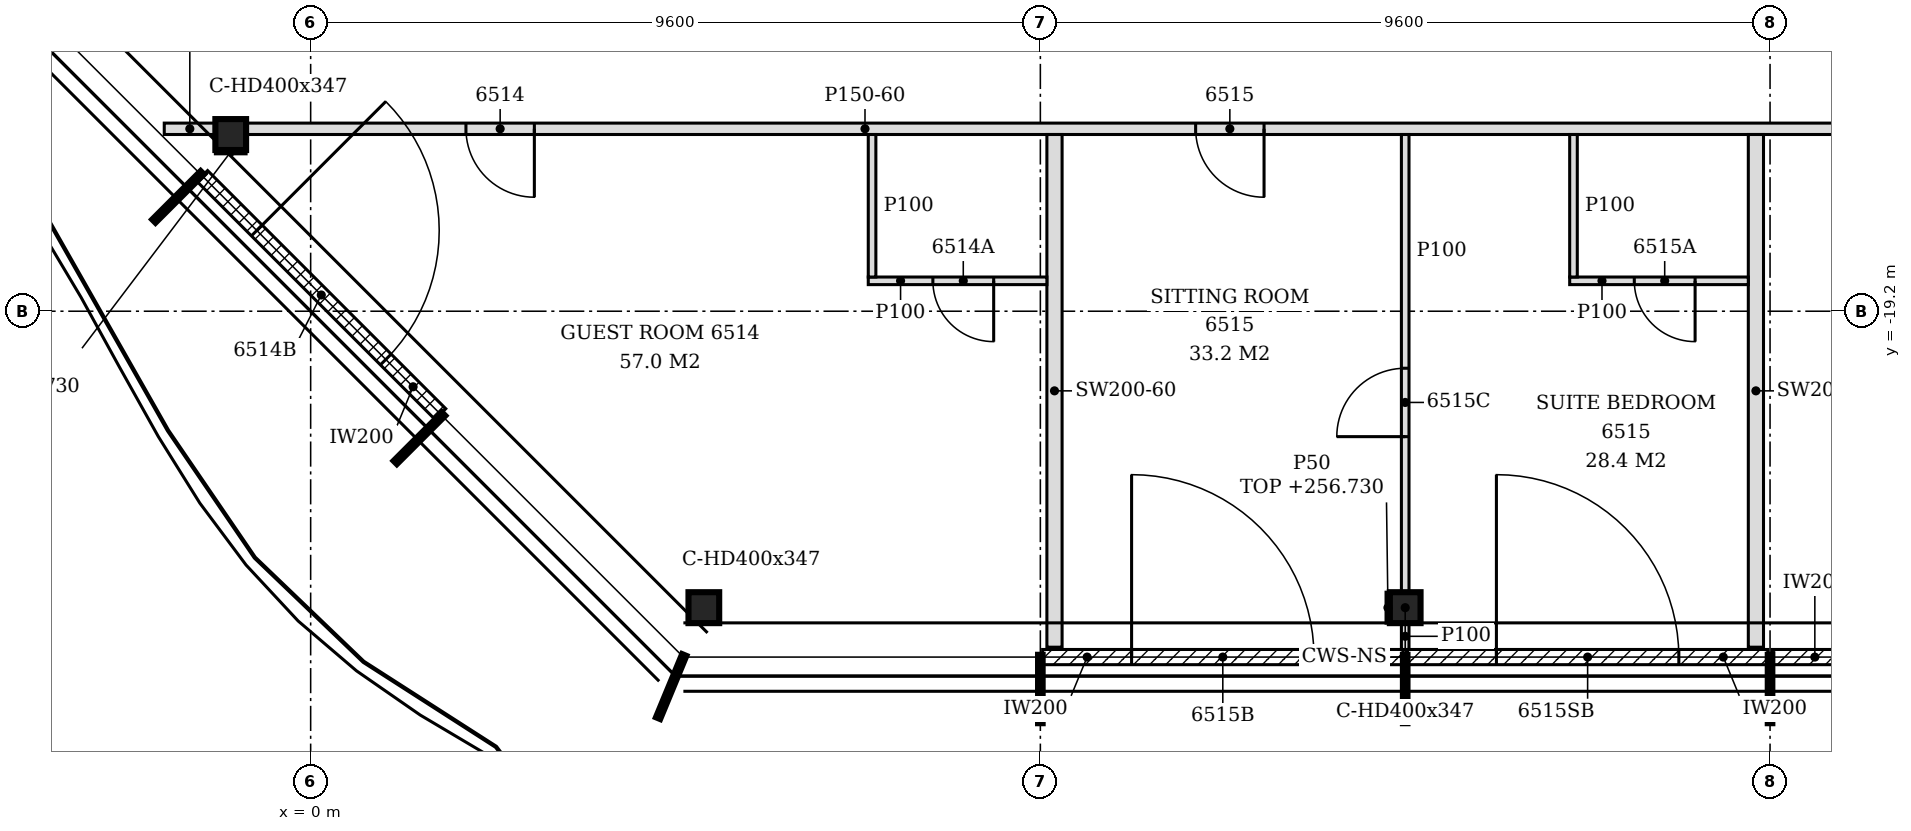
"""IFC4 building model, lengths in metres.
Left out: names, types, materials, properties, quantities, classifications, styles, units other than length and angle.
Written with IfcOpenShell. Run it as: python <this file> out.ifc"""

import sys

from ifc_helpers import new_model, si_unit, direction, frame, frame_2d, origin, origin_2d, place, context, subcontext, project, spatial, polyline, rectangle, i_section, outline, extrude, element, fill, save


model = new_model("IFC4")
c1 = context("Model", 3, precision=1e-05, world=origin(), true_north=direction((0.0, 1.0)))
c2 = subcontext(c1, "Body", "Model", "MODEL_VIEW")
j1 = project(units=[si_unit("LENGTHUNIT", "METRE"), si_unit("PLANEANGLEUNIT", "RADIAN")], contexts=[c1])
p1 = place(None, origin())
s1 = spatial("IfcSite", under=j1, at=p1, CompositionType="ELEMENT")
p2 = place(p1, origin())
s2 = spatial("IfcBuilding", under=s1, at=p2, CompositionType="ELEMENT")
p3 = place(p2, frame((0.0, 0.0, 253.8)))
s3 = spatial("IfcBuildingStorey", under=s2, at=p3, CompositionType="ELEMENT", Elevation=253.8)
for number, where, z_axis, x_axis in (
    (1, (5.173, -23.1, -0.15), (0.0, 0.0, 1.0), (1.0, 0.0, 0.0)),
    (2, (14.4, -23.1, -0.15), (0.0, 0.0, 1.0), (1.0, 0.0, 0.0)),
    (3, (-1.052, -16.876, -0.15), (0.0, 0.0, 1.0), (1.0, 0.0, 0.0)),
):
    element("IfcColumn", number, at=place(p3, frame(where, z_axis=z_axis, x_axis=x_axis)), inside=s3, PredefinedType="COLUMN", context=c2, shape_type="SweptSolid", body=[
        extrude(i_section(OverallWidth=0.404, OverallDepth=0.407, WebThickness=0.027, FlangeThickness=0.044, FilletRadius=0.015, at=origin_2d()), origin(), (0.0, 0.0, 1.0), 3.6),
    ])
p4 = place(p3, frame((9.63, -23.75, 0.0), z_axis=(0.0, 0.0, 1.0), x_axis=(1.0, 0.0, 0.0)))
e4 = element("IfcWall", 4, at=p4, inside=s3, PredefinedType="NOTDEFINED", context=c2, shape_type="SweptSolid", body=[
    extrude(rectangle(XDim=4.74, YDim=0.2, at=frame_2d((2.37, 0.0))), origin(), (0.0, 0.0, 1.0), 3.45),
])
p5 = place(p4, frame((1.17, 0.0, 0.0)))
e5 = element("IfcOpeningElement", 5, at=p5, cuts=e4, PredefinedType="OPENING", context=c2, shape_type="SweptSolid", body=[
    extrude(rectangle(XDim=2.4, YDim=2.4, at=frame_2d((1.2, 1.2))), frame((0.0, 0.11, 0.0), z_axis=(0.0, -1.0, 0.0), x_axis=(1.0, 0.0, 0.0)), (0.0, 0.0, 1.0), 0.22),
])
p6 = place(p3, frame((14.43, -23.75, 0.0), z_axis=(0.0, 0.0, 1.0), x_axis=(1.0, 0.0, 0.0)))
e6 = element("IfcWall", 6, at=p6, inside=s3, PredefinedType="NOTDEFINED", context=c2, shape_type="SweptSolid", body=[
    extrude(rectangle(XDim=4.74, YDim=0.2, at=frame_2d((2.37, 0.0))), origin(), (0.0, 0.0, 1.0), 3.45),
])
p7 = place(p6, frame((1.17, 0.0, 0.0)))
e7 = element("IfcOpeningElement", 7, at=p7, cuts=e6, PredefinedType="OPENING", context=c2, shape_type="SweptSolid", body=[
    extrude(rectangle(XDim=2.4, YDim=2.4, at=frame_2d((1.2, 1.2))), frame((0.0, 0.11, 0.0), z_axis=(0.0, -1.0, 0.0), x_axis=(1.0, 0.0, 0.0)), (0.0, 0.0, 1.0), 0.22),
])
p8 = place(p3, frame((19.23, -23.75, 0.0), z_axis=(0.0, 0.0, 1.0), x_axis=(1.0, 0.0, 0.0)))
e8 = element("IfcWall", 8, at=p8, inside=s3, PredefinedType="NOTDEFINED", context=c2, shape_type="SweptSolid", body=[
    extrude(rectangle(XDim=4.626, YDim=0.2, at=frame_2d((2.313, 0.0))), origin(), (0.0, 0.0, 1.0), 3.45),
])
p9 = place(p8, frame((1.119, 0.0, 0.0)))
e9 = element("IfcOpeningElement", 9, at=p9, cuts=e8, PredefinedType="OPENING", context=c2, shape_type="SweptSolid", body=[
    extrude(rectangle(XDim=2.4, YDim=2.4, at=frame_2d((1.2, 1.2))), frame((0.0, 0.11, 0.0), z_axis=(0.0, -1.0, 0.0), x_axis=(1.0, 0.0, 0.0)), (0.0, 0.0, 1.0), 0.22),
])
p10 = place(p3, frame((-1.427, -17.42, 0.0), z_axis=(0.0, 0.0, 1.0), x_axis=(0.707106781187, -0.707106781187, 0.0)))
e10 = element("IfcWall", 10, at=p10, inside=s3, PredefinedType="NOTDEFINED", context=c2, shape_type="SweptSolid", body=[
    extrude(rectangle(XDim=4.431, YDim=0.2, at=frame_2d((2.216, 0.0))), origin(), (0.0, 0.0, 1.0), 3.45),
])
p11 = place(p10, frame((1.015, 0.0, 0.0)))
e11 = element("IfcOpeningElement", 11, at=p11, cuts=e10, PredefinedType="OPENING", context=c2, shape_type="SweptSolid", body=[
    extrude(rectangle(XDim=2.4, YDim=2.4, at=frame_2d((1.2, 1.2))), frame((0.0, 0.11, 0.0), z_axis=(0.0, -1.0, 0.0), x_axis=(1.0, 0.0, 0.0)), (0.0, 0.0, 1.0), 0.22),
])
p12 = place(p3, frame((14.4, -23.65, 0.0), z_axis=(0.0, 0.0, 1.0), x_axis=(0.0, 1.0, 0.0)))
e12 = element("IfcWall", 12, at=p12, inside=s3, PredefinedType="PARTITIONING", context=c2, shape_type="SweptSolid", body=[
    extrude(rectangle(XDim=0.346, YDim=0.1, at=frame_2d((0.173, 0.0))), origin(), (0.0, 0.0, 1.0), 3.45),
])
p13 = place(p3, frame((9.786, -23.62, 0.0), z_axis=(0.0, 0.0, 1.0), x_axis=(0.0, 1.0, 0.0)))
e13 = element("IfcWall", 13, at=p13, inside=s3, PredefinedType="PARTITIONING", context=c2, shape_type="SweptSolid", body=[
    extrude(outline(polyline([(0.0, 0.0), (6.745, 0.0), (6.745, 3.45), (4.525, 3.45), (4.523, 2.88), (4.315, 2.88), (4.313, 3.45), (0.67, 3.45), (0.668, 2.93), (0.37, 2.93), (0.368, 3.45), (0.0, 3.45), (0.0, 0.0)])), frame((0.0, 0.1, 0.0), z_axis=(0.0, -1.0, 0.0), x_axis=(1.0, 0.0, 0.0)), (0.0, 0.0, 1.0), 0.2),
])
p14 = place(p3, frame((19.014, -23.62, 0.0), z_axis=(0.0, 0.0, 1.0), x_axis=(0.0, 1.0, 0.0)))
e14 = element("IfcWall", 14, at=p14, inside=s3, PredefinedType="PARTITIONING", context=c2, shape_type="SweptSolid", body=[
    extrude(outline(polyline([(0.0, 0.0), (6.745, 0.0), (6.745, 2.73), (0.64, 2.73), (0.638, 2.93), (0.37, 2.93), (0.368, 3.45), (0.0, 3.45), (0.0, 0.0)])), frame((0.0, 0.1, 0.0), z_axis=(0.0, -1.0, 0.0), x_axis=(1.0, 0.0, 0.0)), (0.0, 0.0, 1.0), 0.2),
])
p15 = place(p3, frame((14.4, -22.896, 0.0), z_axis=(0.0, 0.0, 1.0), x_axis=(0.0, 1.0, 0.0)))
e15 = element("IfcWall", 15, at=p15, inside=s3, PredefinedType="PARTITIONING", context=c2, shape_type="SweptSolid", body=[
    extrude(outline(polyline([(0.0, 0.0), (6.021, 0.0), (6.021, 3.45), (3.802, 3.45), (3.8, 2.88), (3.592, 2.88), (3.59, 3.45), (0.0, 3.45), (0.0, 0.0)])), frame((0.0, 0.05, 0.0), z_axis=(0.0, -1.0, 0.0), x_axis=(1.0, 0.0, 0.0)), (0.0, 0.0, 1.0), 0.1),
])
p16 = place(p15, frame((2.046, 0.0, 0.0)))
e16 = element("IfcOpeningElement", 16, at=p16, cuts=e15, PredefinedType="OPENING", context=c2, shape_type="SweptSolid", body=[
    extrude(rectangle(XDim=0.9, YDim=2.1, at=frame_2d((0.45, 1.05))), frame((0.0, 0.06, 0.0), z_axis=(0.0, -1.0, 0.0), x_axis=(1.0, 0.0, 0.0)), (0.0, 0.0, 1.0), 0.12),
])
p17 = place(p3, frame((7.336, -18.8, 0.0), z_axis=(0.0, 0.0, 1.0), x_axis=(1.0, 0.0, 0.0)))
e17 = element("IfcWall", 17, at=p17, inside=s3, PredefinedType="PARTITIONING", context=c2, shape_type="SweptSolid", body=[
    extrude(outline(polyline([(0.0, 0.0), (2.35, 0.0), (2.35, 3.45), (0.014, 3.45), (0.012, 2.73), (0.0, 2.73), (0.0, 0.0)])), frame((0.0, 0.05, 0.0), z_axis=(0.0, -1.0, 0.0), x_axis=(1.0, 0.0, 0.0)), (0.0, 0.0, 1.0), 0.1),
])
p18 = place(p17, frame((0.85, 0.0, 0.0)))
e18 = element("IfcOpeningElement", 18, at=p18, cuts=e17, PredefinedType="OPENING", context=c2, shape_type="SweptSolid", body=[
    extrude(rectangle(XDim=0.8, YDim=2.1, at=frame_2d((0.4, 1.05))), frame((0.0, 0.06, 0.0), z_axis=(0.0, -1.0, 0.0), x_axis=(1.0, 0.0, 0.0)), (0.0, 0.0, 1.0), 0.12),
])
p19 = place(p3, frame((7.386, -18.75, 0.0), z_axis=(0.0, 0.0, 1.0), x_axis=(0.0, 1.0, 0.0)))
e19 = element("IfcWall", 19, at=p19, inside=s3, PredefinedType="PARTITIONING", context=c2, shape_type="SweptSolid", body=[
    extrude(rectangle(XDim=1.875, YDim=0.1, at=frame_2d((0.938, 0.0))), origin(), (0.0, 0.0, 1.0), 3.45),
])
p20 = place(p3, frame((16.564, -18.8, 0.0), z_axis=(0.0, 0.0, 1.0), x_axis=(1.0, 0.0, 0.0)))
e20 = element("IfcWall", 20, at=p20, inside=s3, PredefinedType="PARTITIONING", context=c2, shape_type="SweptSolid", body=[
    extrude(rectangle(XDim=2.35, YDim=0.1, at=frame_2d((1.175, 0.0))), origin(), (0.0, 0.0, 1.0), 3.45),
])
p21 = place(p20, frame((0.85, 0.0, 0.0)))
e21 = element("IfcOpeningElement", 21, at=p21, cuts=e20, PredefinedType="OPENING", context=c2, shape_type="SweptSolid", body=[
    extrude(rectangle(XDim=0.8, YDim=2.1, at=frame_2d((0.4, 1.05))), frame((0.0, 0.06, 0.0), z_axis=(0.0, -1.0, 0.0), x_axis=(1.0, 0.0, 0.0)), (0.0, 0.0, 1.0), 0.12),
])
p22 = place(p3, frame((16.614, -18.75, 0.0), z_axis=(0.0, 0.0, 1.0), x_axis=(0.0, 1.0, 0.0)))
e22 = element("IfcWall", 22, at=p22, inside=s3, PredefinedType="PARTITIONING", context=c2, shape_type="SweptSolid", body=[
    extrude(rectangle(XDim=1.875, YDim=0.1, at=frame_2d((0.938, 0.0))), origin(), (0.0, 0.0, 1.0), 3.45),
])
p23 = place(p3, frame((-1.926, -16.8, 0.0), z_axis=(0.0, 0.0, 1.0), x_axis=(1.0, 0.0, 0.0)))
e23 = element("IfcWall", 23, at=p23, inside=s3, PredefinedType="PARTITIONING", context=c2, shape_type="SweptSolid", body=[
    extrude(outline(polyline([(0.0, 0.0), (0.673, 0.0), (0.673, 2.63), (0.229, 2.63), (0.227, 3.45), (0.0, 3.45), (0.0, 0.0)])), frame((0.0, 0.075, 0.0), z_axis=(0.0, -1.0, 0.0), x_axis=(1.0, 0.0, 0.0)), (0.0, 0.0, 1.0), 0.15),
])
p24 = place(p3, frame((-0.85, -16.8, 0.0), z_axis=(0.0, 0.0, 1.0), x_axis=(1.0, 0.0, 0.0)))
e24 = element("IfcWall", 24, at=p24, inside=s3, PredefinedType="PARTITIONING", context=c2, shape_type="SweptSolid", body=[
    extrude(outline(polyline([(0.0, 0.0), (21.974, 0.0), (21.974, 3.45), (20.199, 3.45), (20.198, 2.73), (19.899, 2.73), (19.897, 3.45), (8.199, 3.45), (8.198, 2.73), (7.899, 2.73), (7.897, 3.45), (0.0, 3.45), (0.0, 0.0)])), frame((0.0, 0.075, 0.0), z_axis=(0.0, -1.0, 0.0), x_axis=(1.0, 0.0, 0.0)), (0.0, 0.0, 1.0), 0.15),
])
p25 = place(p24, frame((2.893, 0.0, 0.0)))
e25 = element("IfcOpeningElement", 25, at=p25, cuts=e24, PredefinedType="OPENING", context=c2, shape_type="SweptSolid", body=[
    extrude(rectangle(XDim=0.9, YDim=2.1, at=frame_2d((0.45, 1.05))), frame((0.0, 0.085, 0.0), z_axis=(0.0, -1.0, 0.0), x_axis=(1.0, 0.0, 0.0)), (0.0, 0.0, 1.0), 0.17),
])
p26 = place(p24, frame((12.492, 0.0, 0.0)))
e26 = element("IfcOpeningElement", 26, at=p26, cuts=e24, PredefinedType="OPENING", context=c2, shape_type="SweptSolid", body=[
    extrude(rectangle(XDim=0.9, YDim=2.1, at=frame_2d((0.45, 1.05))), frame((0.0, 0.085, 0.0), z_axis=(0.0, -1.0, 0.0), x_axis=(1.0, 0.0, 0.0)), (0.0, 0.0, 1.0), 0.17),
])
p27 = place(p3, frame((14.173, -23.303, 0.0), z_axis=(0.0, 0.0, 1.0), x_axis=(0.0, 1.0, 0.0)))
e27 = element("IfcWall", 27, at=p27, inside=s3, PredefinedType="PARTITIONING", context=c2, shape_type="SweptSolid", body=[
    extrude(rectangle(XDim=0.407, YDim=0.05, at=frame_2d((0.204, 0.0))), origin(), (0.0, 0.0, 1.0), 2.93),
])
p28 = place(p3, frame((-1.253, -17.104, 0.0), z_axis=(0.0, 0.0, 1.0), x_axis=(1.0, 0.0, 0.0)))
e28 = element("IfcWall", 28, at=p28, inside=s3, PredefinedType="PARTITIONING", context=c2, shape_type="SweptSolid", body=[
    extrude(rectangle(XDim=0.404, YDim=0.05, at=frame_2d((0.202, 0.0))), origin(), (0.0, 0.0, 1.0), 2.93),
])
p29 = place(p5, origin())
e29 = element("IfcDoor", 29, at=p29, inside=s3, OperationType="SINGLE_SWING_LEFT", PredefinedType="DOOR", context=c2, shape_type="SweptSolid", body=[
    extrude(rectangle(XDim=2.4, YDim=2.4, at=frame_2d((1.2, 1.2))), frame((0.0, 0.025, 0.0), z_axis=(0.0, -1.0, 0.0), x_axis=(1.0, 0.0, 0.0)), (0.0, 0.0, 1.0), 0.05),
])
fill(e5, e29)
p30 = place(p7, origin())
e30 = element("IfcDoor", 30, at=p30, inside=s3, OperationType="SINGLE_SWING_LEFT", PredefinedType="DOOR", context=c2, shape_type="SweptSolid", body=[
    extrude(rectangle(XDim=2.4, YDim=2.4, at=frame_2d((1.2, 1.2))), frame((0.0, 0.025, 0.0), z_axis=(0.0, -1.0, 0.0), x_axis=(1.0, 0.0, 0.0)), (0.0, 0.0, 1.0), 0.05),
])
fill(e7, e30)
p31 = place(p11, origin())
e31 = element("IfcDoor", 31, at=p31, inside=s3, OperationType="SINGLE_SWING_LEFT", PredefinedType="DOOR", context=c2, shape_type="SweptSolid", body=[
    extrude(rectangle(XDim=2.4, YDim=2.4, at=frame_2d((1.2, 1.2))), frame((0.0, 0.025, 0.0), z_axis=(0.0, -1.0, 0.0), x_axis=(1.0, 0.0, 0.0)), (0.0, 0.0, 1.0), 0.05),
])
fill(e11, e31)
p32 = place(p25, frame((0.9, 0.0, 0.0), z_axis=(0.0, 0.0, 1.0), x_axis=(-1.0, 0.0, 0.0)))
e32 = element("IfcDoor", 32, at=p32, inside=s3, OperationType="SINGLE_SWING_LEFT", PredefinedType="DOOR", context=c2, shape_type="SweptSolid", body=[
    extrude(rectangle(XDim=0.9, YDim=2.1, at=frame_2d((0.45, 1.05))), frame((0.0, 0.025, 0.0), z_axis=(0.0, -1.0, 0.0), x_axis=(1.0, 0.0, 0.0)), (0.0, 0.0, 1.0), 0.05),
])
fill(e25, e32)
p33 = place(p18, frame((0.8, 0.0, 0.0), z_axis=(0.0, 0.0, 1.0), x_axis=(-1.0, 0.0, 0.0)))
e33 = element("IfcDoor", 33, at=p33, inside=s3, OperationType="SINGLE_SWING_LEFT", PredefinedType="DOOR", context=c2, shape_type="SweptSolid", body=[
    extrude(rectangle(XDim=0.8, YDim=2.1, at=frame_2d((0.4, 1.05))), frame((0.0, 0.025, 0.0), z_axis=(0.0, -1.0, 0.0), x_axis=(1.0, 0.0, 0.0)), (0.0, 0.0, 1.0), 0.05),
])
fill(e18, e33)
p34 = place(p26, frame((0.9, 0.0, 0.0), z_axis=(0.0, 0.0, 1.0), x_axis=(-1.0, 0.0, 0.0)))
e34 = element("IfcDoor", 34, at=p34, inside=s3, OperationType="SINGLE_SWING_LEFT", PredefinedType="DOOR", context=c2, shape_type="SweptSolid", body=[
    extrude(rectangle(XDim=0.9, YDim=2.1, at=frame_2d((0.45, 1.05))), frame((0.0, 0.025, 0.0), z_axis=(0.0, -1.0, 0.0), x_axis=(1.0, 0.0, 0.0)), (0.0, 0.0, 1.0), 0.05),
])
fill(e26, e34)
p35 = place(p16, origin())
e35 = element("IfcDoor", 35, at=p35, inside=s3, OperationType="SINGLE_SWING_LEFT", PredefinedType="DOOR", context=c2, shape_type="SweptSolid", body=[
    extrude(rectangle(XDim=0.9, YDim=2.1, at=frame_2d((0.45, 1.05))), frame((0.0, 0.025, 0.0), z_axis=(0.0, -1.0, 0.0), x_axis=(1.0, 0.0, 0.0)), (0.0, 0.0, 1.0), 0.05),
])
fill(e16, e35)
p36 = place(p21, frame((0.8, 0.0, 0.0), z_axis=(0.0, 0.0, 1.0), x_axis=(-1.0, 0.0, 0.0)))
e36 = element("IfcDoor", 36, at=p36, inside=s3, OperationType="SINGLE_SWING_LEFT", PredefinedType="DOOR", context=c2, shape_type="SweptSolid", body=[
    extrude(rectangle(XDim=0.8, YDim=2.1, at=frame_2d((0.4, 1.05))), frame((0.0, 0.025, 0.0), z_axis=(0.0, -1.0, 0.0), x_axis=(1.0, 0.0, 0.0)), (0.0, 0.0, 1.0), 0.05),
])
fill(e21, e36)
save(model, sys.argv[1])
